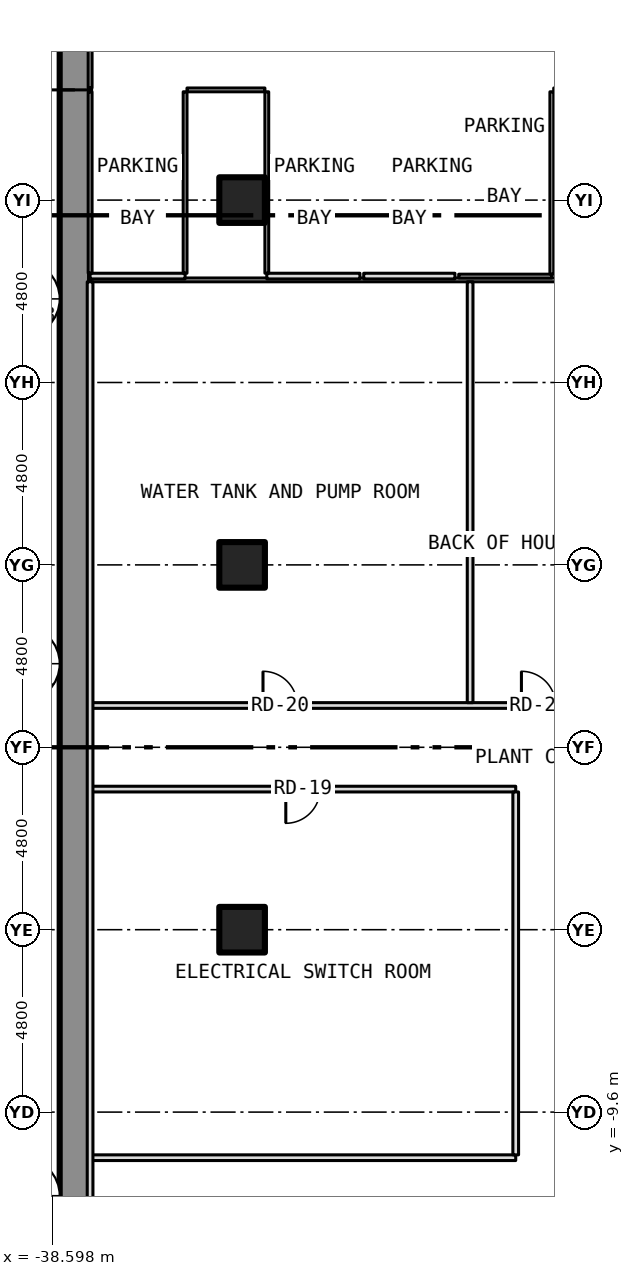
"""IFC4 building model, lengths in metres.
Left out: names, types, materials, properties, quantities, classifications, styles, units other than length and angle.
Written with IfcOpenShell. Run it as: python <this file> out.ifc"""

import sys

from ifc_helpers import new_model, si_unit, direction, frame, frame_2d, origin, origin_2d, place, context, subcontext, project, spatial, rectangle, hollow_rectangle, extrude, element, fill, save


model = new_model("IFC4")
c1 = context("Model", 3, precision=1e-05, world=origin(), true_north=direction((0.0, 1.0)))
c2 = subcontext(c1, "Body", "Model", "MODEL_VIEW")
j1 = project(units=[si_unit("LENGTHUNIT", "METRE"), si_unit("PLANEANGLEUNIT", "RADIAN")], contexts=[c1])
p1 = place(None, origin())
s1 = spatial("IfcSite", under=j1, at=p1, CompositionType="ELEMENT")
p2 = place(p1, origin())
s2 = spatial("IfcBuilding", under=s1, at=p2, CompositionType="ELEMENT")
p3 = place(p2, frame((0.0, 0.0, -5.0)))
s3 = spatial("IfcBuildingStorey", under=s2, at=p3, CompositionType="ELEMENT", Elevation=-5.0)
for number, where, z_axis, x_axis in (
    (1, (-33.6, -4.8, -0.3), (0.0, 0.0, 1.0), (1.0, 0.0, 0.0)),
    (2, (-33.6, 4.8, -0.3), (0.0, 0.0, 1.0), (1.0, 0.0, 0.0)),
    (3, (-33.6, 14.4, -0.3), (0.0, 0.0, 1.0), (1.0, 0.0, 0.0)),
):
    element("IfcColumn", number, at=place(p3, frame(where, z_axis=z_axis, x_axis=x_axis)), inside=s3, PredefinedType="COLUMN", context=c2, shape_type="SweptSolid", body=[
        extrude(hollow_rectangle(XDim=1.2, YDim=1.2, WallThickness=0.07, at=origin_2d()), origin(), (0.0, 0.0, 1.0), 5.0),
    ])
p4 = place(p3, frame((-38.0, -38.4, -0.3), z_axis=(0.0, 0.0, 1.0), x_axis=(0.0, 1.0, 0.0)))
e4 = element("IfcWall", 4, at=p4, inside=s3, PredefinedType="SOLIDWALL", context=c2, shape_type="SweptSolid", body=[
    extrude(rectangle(XDim=67.2, YDim=0.8, at=frame_2d((33.6, 0.0))), origin(), (0.0, 0.0, 1.0), 4.378),
])
p5 = place(p4, frame((55.7, 0.0, 0.0)))
e5 = element("IfcOpeningElement", 5, at=p5, cuts=e4, PredefinedType="OPENING", context=c2, shape_type="SweptSolid", body=[
    extrude(rectangle(XDim=6.0, YDim=2.5, at=frame_2d((3.0, 1.25))), frame((0.0, 0.412, 0.0), z_axis=(0.0, -1.0, 0.0), x_axis=(1.0, 0.0, 0.0)), (0.0, 0.0, 1.0), 0.824),
])
p6 = place(p2, frame((0.0, 0.0, -10.0)))
s4 = spatial("IfcBuildingStorey", under=s2, at=p6, CompositionType="ELEMENT", Elevation=-10.0)
p7 = place(p6, frame((-46.9, 17.15, 4.7), z_axis=(0.0, 0.0, 1.0), x_axis=(1.0, 0.0, 0.0)))
e6 = element("IfcWall", 6, at=p7, inside=s4, PredefinedType="SOLIDWALL", context=c2, shape_type="SweptSolid", body=[
    extrude(rectangle(XDim=8.5, YDim=0.5, at=frame_2d((4.25, 0.0))), origin(), (0.0, 0.0, 1.0), 5.45),
])
p8 = place(p3, frame((-37.6, -10.8, 0.0), z_axis=(0.0, 0.0, 1.0), x_axis=(1.0, 0.0, 0.0)))
e7 = element("IfcWall", 7, at=p8, inside=s3, PredefinedType="PARTITIONING", context=c2, shape_type="SweptSolid", body=[
    extrude(rectangle(XDim=11.2, YDim=0.15, at=frame_2d((5.6, 0.0))), origin(), (0.0, 0.0, 1.0), 4.7),
])
p9 = place(p3, frame((-37.6, -1.1, 0.0), z_axis=(0.0, 0.0, 1.0), x_axis=(1.0, 0.0, 0.0)))
e8 = element("IfcWall", 8, at=p9, inside=s3, PredefinedType="PARTITIONING", context=c2, shape_type="SweptSolid", body=[
    extrude(rectangle(XDim=11.2, YDim=0.15, at=frame_2d((5.6, 0.0))), origin(), (0.0, 0.0, 1.0), 4.7),
])
p10 = place(p9, frame((5.15, 0.0, 0.0)))
e9 = element("IfcOpeningElement", 9, at=p10, cuts=e8, PredefinedType="OPENING", context=c2, shape_type="SweptSolid", body=[
    extrude(rectangle(XDim=0.9, YDim=2.1, at=frame_2d((0.45, 1.05))), frame((0.0, 0.087, 0.0), z_axis=(0.0, -1.0, 0.0), x_axis=(1.0, 0.0, 0.0)), (0.0, 0.0, 1.0), 0.174),
])
p11 = place(p3, frame((-37.6, 1.1, 0.0), z_axis=(0.0, 0.0, 1.0), x_axis=(1.0, 0.0, 0.0)))
e10 = element("IfcWall", 10, at=p11, inside=s3, PredefinedType="PARTITIONING", context=c2, shape_type="SweptSolid", body=[
    extrude(rectangle(XDim=13.48, YDim=0.15, at=frame_2d((6.74, 0.0))), origin(), (0.0, 0.0, 1.0), 4.7),
])
p12 = place(p11, frame((4.55, 0.0, 0.0)))
e11 = element("IfcOpeningElement", 11, at=p12, cuts=e10, PredefinedType="OPENING", context=c2, shape_type="SweptSolid", body=[
    extrude(rectangle(XDim=0.9, YDim=2.1, at=frame_2d((0.45, 1.05))), frame((0.0, 0.087, 0.0), z_axis=(0.0, -1.0, 0.0), x_axis=(1.0, 0.0, 0.0)), (0.0, 0.0, 1.0), 0.174),
])
p13 = place(p11, frame((11.35, 0.0, 0.0)))
e12 = element("IfcOpeningElement", 12, at=p13, cuts=e10, PredefinedType="OPENING", context=c2, shape_type="SweptSolid", body=[
    extrude(rectangle(XDim=0.9, YDim=2.1, at=frame_2d((0.45, 1.05))), frame((0.0, 0.087, 0.0), z_axis=(0.0, -1.0, 0.0), x_axis=(1.0, 0.0, 0.0)), (0.0, 0.0, 1.0), 0.174),
])
p14 = place(p3, frame((-37.6, 12.3, 0.0), z_axis=(0.0, 0.0, 1.0), x_axis=(1.0, 0.0, 0.0)))
e13 = element("IfcWall", 13, at=p14, inside=s3, PredefinedType="PARTITIONING", context=c2, shape_type="SweptSolid", body=[
    extrude(rectangle(XDim=70.0, YDim=0.1, at=frame_2d((35.0, 0.0))), origin(), (0.0, 0.0, 1.0), 4.7),
])
p15 = place(p3, frame((-37.6, 12.4, 0.0), z_axis=(0.0, 0.0, 1.0), x_axis=(1.0, 0.0, 0.0)))
e14 = element("IfcWall", 14, at=p15, inside=s3, PredefinedType="PARTITIONING", context=c2, shape_type="SweptSolid", body=[
    extrude(rectangle(XDim=2.5, YDim=0.15, at=frame_2d((1.25, 0.0))), origin(), (0.0, 0.0, 1.0), 4.7),
])
p16 = place(p3, frame((-32.95, 12.4, 0.0), z_axis=(0.0, 0.0, 1.0), x_axis=(1.0, 0.0, 0.0)))
e15 = element("IfcWall", 15, at=p16, inside=s3, PredefinedType="PARTITIONING", context=c2, shape_type="SweptSolid", body=[
    extrude(rectangle(XDim=2.45, YDim=0.15, at=frame_2d((1.225, 0.0))), origin(), (0.0, 0.0, 1.0), 4.7),
])
p17 = place(p3, frame((-30.4, 12.4, 0.0), z_axis=(0.0, 0.0, 1.0), x_axis=(1.0, 0.0, 0.0)))
e16 = element("IfcWall", 16, at=p17, inside=s3, PredefinedType="PARTITIONING", context=c2, shape_type="SweptSolid", body=[
    extrude(rectangle(XDim=2.4, YDim=0.15, at=frame_2d((1.2, 0.0))), origin(), (0.0, 0.0, 1.0), 4.7),
])
p18 = place(p3, frame((-27.9, 12.4, 0.0), z_axis=(0.0, 0.0, 1.0), x_axis=(1.0, 0.0, 0.0)))
e17 = element("IfcWall", 17, at=p18, inside=s3, PredefinedType="PARTITIONING", context=c2, shape_type="SweptSolid", body=[
    extrude(rectangle(XDim=2.45, YDim=0.1, at=frame_2d((1.225, 0.0))), origin(), (0.0, 0.0, 1.0), 4.7),
])
p19 = place(p3, frame((-35.05, 17.3, 0.0), z_axis=(0.0, 0.0, 1.0), x_axis=(1.0, 0.0, 0.0)))
e18 = element("IfcWall", 18, at=p19, inside=s3, PredefinedType="PARTITIONING", context=c2, shape_type="SweptSolid", body=[
    extrude(rectangle(XDim=2.05, YDim=0.1, at=frame_2d((1.025, 0.0))), origin(), (0.0, 0.0, 1.0), 4.7),
])
p20 = place(p3, frame((-37.6, -21.825, 0.0), z_axis=(0.0, 0.0, 1.0), x_axis=(0.0, 1.0, 0.0)))
e19 = element("IfcWall", 19, at=p20, inside=s3, PredefinedType="PARTITIONING", context=c2, shape_type="SweptSolid", body=[
    extrude(rectangle(XDim=34.075, YDim=0.15, at=frame_2d((17.038, 0.0))), origin(), (0.0, 0.0, 1.0), 4.7),
])
p21 = place(p3, frame((-37.6, 12.475, 0.0), z_axis=(0.0, 0.0, 1.0), x_axis=(0.0, 1.0, 0.0)))
e20 = element("IfcWall", 20, at=p21, inside=s3, PredefinedType="PARTITIONING", context=c2, shape_type="SweptSolid", body=[
    extrude(rectangle(XDim=4.775, YDim=0.1, at=frame_2d((2.387, 0.0))), origin(), (0.0, 0.0, 1.0), 4.7),
])
p22 = place(p3, frame((-37.6, 17.35, 0.0), z_axis=(0.0, 0.0, 1.0), x_axis=(0.0, 1.0, 0.0)))
e21 = element("IfcWall", 21, at=p22, inside=s3, PredefinedType="PARTITIONING", context=c2, shape_type="SweptSolid", body=[
    extrude(rectangle(XDim=5.9, YDim=0.1, at=frame_2d((2.95, 0.0))), origin(), (0.0, 0.0, 1.0), 4.7),
])
for number, where, z_axis, x_axis in (
    (22, (-35.1, 12.475, 0.0), (0.0, 0.0, 1.0), (0.0, 1.0, 0.0)),
    (23, (-32.95, 12.475, 0.0), (0.0, 0.0, 1.0), (0.0, 1.0, 0.0)),
):
    element("IfcWall", number, at=place(p3, frame(where, z_axis=z_axis, x_axis=x_axis)), inside=s3, PredefinedType="PARTITIONING", context=c2, shape_type="SweptSolid", body=[
        extrude(rectangle(XDim=4.775, YDim=0.1, at=frame_2d((2.387, 0.0))), origin(), (0.0, 0.0, 1.0), 4.7),
    ])
p23 = place(p3, frame((-27.6, 1.175, 0.0), z_axis=(0.0, 0.0, 1.0), x_axis=(0.0, 1.0, 0.0)))
e24 = element("IfcWall", 24, at=p23, inside=s3, PredefinedType="PARTITIONING", context=c2, shape_type="SweptSolid", body=[
    extrude(rectangle(XDim=11.075, YDim=0.15, at=frame_2d((5.538, 0.0))), origin(), (0.0, 0.0, 1.0), 4.7),
])
p24 = place(p3, frame((-26.4, -10.725, 0.0), z_axis=(0.0, 0.0, 1.0), x_axis=(0.0, 1.0, 0.0)))
e25 = element("IfcWall", 25, at=p24, inside=s3, PredefinedType="PARTITIONING", context=c2, shape_type="SweptSolid", body=[
    extrude(rectangle(XDim=9.55, YDim=0.15, at=frame_2d((4.775, 0.0))), origin(), (0.0, 0.0, 1.0), 4.7),
])
p25 = place(p3, frame((-25.45, 12.45, 0.0), z_axis=(0.0, 0.0, 1.0), x_axis=(0.0, 1.0, 0.0)))
e26 = element("IfcWall", 26, at=p25, inside=s3, PredefinedType="PARTITIONING", context=c2, shape_type="SweptSolid", body=[
    extrude(rectangle(XDim=4.8, YDim=0.1, at=frame_2d((2.4, 0.0))), origin(), (0.0, 0.0, 1.0), 4.7),
])
p26 = place(p5, origin())
e27 = element("IfcDoor", 27, at=p26, inside=s3, OperationType="ROLLINGUP", PredefinedType="GATE", context=c2, shape_type="SweptSolid", body=[
    extrude(rectangle(XDim=6.0, YDim=2.5, at=frame_2d((3.0, 1.25))), frame((0.0, 0.025, 0.0), z_axis=(0.0, -1.0, 0.0), x_axis=(1.0, 0.0, 0.0)), (0.0, 0.0, 1.0), 0.05),
])
fill(e5, e27)
p27 = place(p10, origin())
e28 = element("IfcDoor", 28, at=p27, inside=s3, OperationType="SINGLE_SWING_LEFT", PredefinedType="DOOR", context=c2, shape_type="SweptSolid", body=[
    extrude(rectangle(XDim=0.9, YDim=2.1, at=frame_2d((0.45, 1.05))), frame((0.0, 0.025, 0.0), z_axis=(0.0, -1.0, 0.0), x_axis=(1.0, 0.0, 0.0)), (0.0, 0.0, 1.0), 0.05),
])
fill(e9, e28)
p28 = place(p12, origin())
e29 = element("IfcDoor", 29, at=p28, inside=s3, OperationType="SINGLE_SWING_LEFT", PredefinedType="DOOR", context=c2, shape_type="SweptSolid", body=[
    extrude(rectangle(XDim=0.9, YDim=2.1, at=frame_2d((0.45, 1.05))), frame((0.0, 0.025, 0.0), z_axis=(0.0, -1.0, 0.0), x_axis=(1.0, 0.0, 0.0)), (0.0, 0.0, 1.0), 0.05),
])
fill(e11, e29)
p29 = place(p13, origin())
e30 = element("IfcDoor", 30, at=p29, inside=s3, OperationType="SINGLE_SWING_LEFT", PredefinedType="DOOR", context=c2, shape_type="SweptSolid", body=[
    extrude(rectangle(XDim=0.9, YDim=2.1, at=frame_2d((0.45, 1.05))), frame((0.0, 0.025, 0.0), z_axis=(0.0, -1.0, 0.0), x_axis=(1.0, 0.0, 0.0)), (0.0, 0.0, 1.0), 0.05),
])
fill(e12, e30)
save(model, sys.argv[1])
